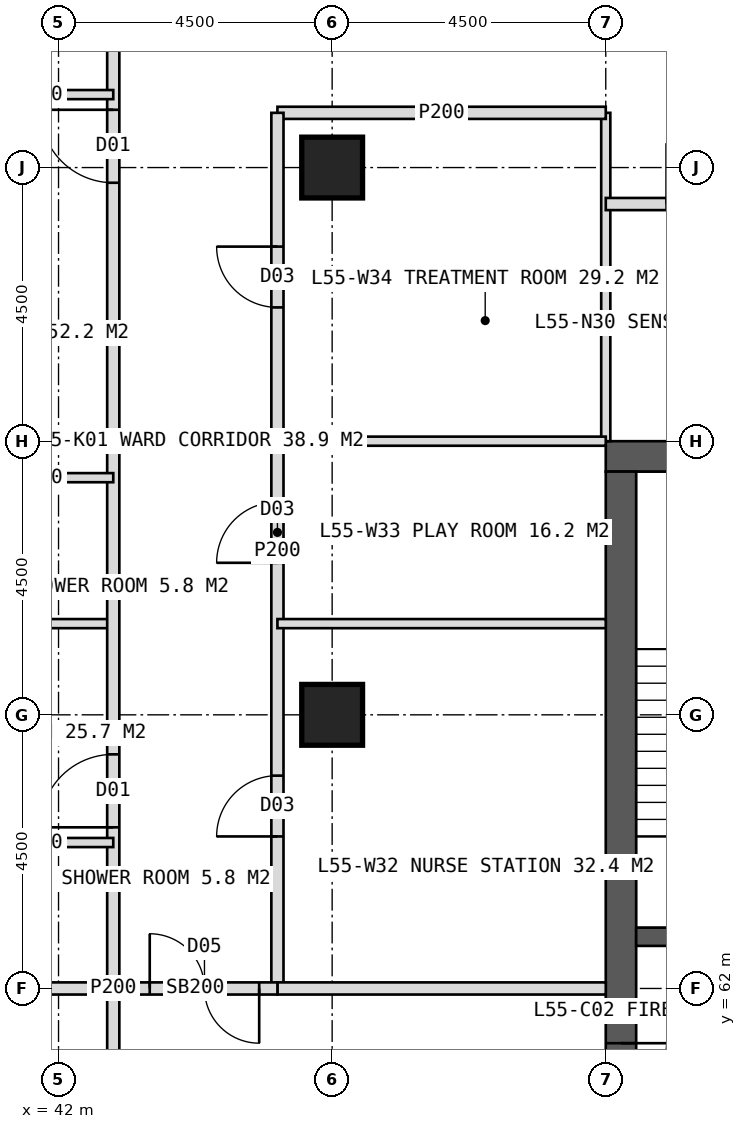
"""IFC4 building model, lengths in metres.
Left out: names, types, materials, properties, quantities, classifications, styles, units other than length and angle.
Written with IfcOpenShell. Run it as: python <this file> out.ifc"""

import sys

from ifc_helpers import new_model, si_unit, direction, frame, frame_2d, origin, origin_2d, place, context, subcontext, project, spatial, rectangle, hollow_rectangle, extrude, element, fill, save


model = new_model("IFC4")
c1 = context("Model", 3, precision=1e-05, world=origin(), true_north=direction((0.0, 1.0)))
c2 = subcontext(c1, "Body", "Model", "MODEL_VIEW")
j1 = project(units=[si_unit("LENGTHUNIT", "METRE"), si_unit("PLANEANGLEUNIT", "RADIAN")], contexts=[c1])
p1 = place(None, origin())
s1 = spatial("IfcSite", under=j1, at=p1, CompositionType="ELEMENT")
p2 = place(p1, origin())
s2 = spatial("IfcBuilding", under=s1, at=p2, CompositionType="ELEMENT")
p3 = place(p2, frame((0.0, 0.0, 229.0)))
s3 = spatial("IfcBuildingStorey", under=s2, at=p3, CompositionType="ELEMENT", Elevation=229.0)
p4 = place(p3, frame((51.0, 70.75, 0.0), z_axis=(0.0, 0.0, 1.0), x_axis=(1.0, 0.0, 0.0)))
e1 = element("IfcWall", 1, at=p4, inside=s3, PredefinedType="SHEAR", context=c2, shape_type="SweptSolid", body=[
    extrude(rectangle(XDim=18.0, YDim=0.5, at=frame_2d((9.0, 0.0))), origin(), (0.0, 0.0, 1.0), 4.0),
])
p5 = place(p4, frame((8.1, 0.0, 0.0)))
e2 = element("IfcOpeningElement", 2, at=p5, cuts=e1, PredefinedType="OPENING", context=c2, shape_type="SweptSolid", body=[
    extrude(rectangle(XDim=1.8, YDim=2.2, at=frame_2d((0.9, 1.1))), frame((0.0, 0.26, 0.0), z_axis=(0.0, -1.0, 0.0), x_axis=(1.0, 0.0, 0.0)), (0.0, 0.0, 1.0), 0.52),
])
p6 = place(p3, frame((51.25, 53.5, 0.0), z_axis=(0.0, 0.0, 1.0), x_axis=(0.0, 1.0, 0.0)))
e3 = element("IfcWall", 3, at=p6, inside=s3, PredefinedType="SHEAR", context=c2, shape_type="SweptSolid", body=[
    extrude(rectangle(XDim=17.0, YDim=0.5, at=frame_2d((8.5, 0.0))), origin(), (0.0, 0.0, 1.0), 4.0),
])
p7 = place(p6, frame((6.1, 0.0, 0.0)))
e4 = element("IfcOpeningElement", 4, at=p7, cuts=e3, PredefinedType="OPENING", context=c2, shape_type="SweptSolid", body=[
    extrude(rectangle(XDim=1.5, YDim=2.2, at=frame_2d((0.75, 1.1))), frame((0.0, 0.26, 0.0), z_axis=(0.0, -1.0, 0.0), x_axis=(1.0, 0.0, 0.0)), (0.0, 0.0, 1.0), 0.52),
])
p8 = place(p3, frame((51.5, 62.85, 0.0), z_axis=(0.0, 0.0, 1.0), x_axis=(1.0, 0.0, 0.0)))
e5 = element("IfcWall", 5, at=p8, inside=s3, PredefinedType="SHEAR", context=c2, shape_type="SweptSolid", body=[
    extrude(rectangle(XDim=3.3, YDim=0.3, at=frame_2d((1.65, 0.0))), origin(), (0.0, 0.0, 1.0), 4.0),
])
p9 = place(p8, frame((1.15, 0.0, 0.0)))
e6 = element("IfcOpeningElement", 6, at=p9, cuts=e5, PredefinedType="OPENING", context=c2, shape_type="SweptSolid", body=[
    extrude(rectangle(XDim=1.2, YDim=2.1, at=frame_2d((0.6, 1.05))), frame((0.0, 0.16, 0.0), z_axis=(0.0, -1.0, 0.0), x_axis=(1.0, 0.0, 0.0)), (0.0, 0.0, 1.0), 0.32),
])
for number, where, z_axis, x_axis in (
    (7, (46.5, 75.5, 0.0), (0.0, 0.0, 1.0), (1.0, 0.0, 0.0)),
    (8, (46.5, 66.5, 0.0), (0.0, 0.0, 1.0), (1.0, 0.0, 0.0)),
):
    element("IfcColumn", number, at=place(p3, frame(where, z_axis=z_axis, x_axis=x_axis)), inside=s3, PredefinedType="COLUMN", context=c2, shape_type="SweptSolid", body=[
        extrude(hollow_rectangle(XDim=1.0, YDim=1.0, WallThickness=0.1, at=origin_2d()), origin(), (0.0, 0.0, 1.0), 4.0),
    ])
p10 = place(p3, frame((51.0, 71.0, 0.0), z_axis=(0.0, 0.0, 1.0), x_axis=(0.0, 1.0, 0.0)))
e9 = element("IfcWall", 9, at=p10, inside=s3, PredefinedType="PARTITIONING", context=c2, shape_type="SweptSolid", body=[
    extrude(rectangle(XDim=5.4, YDim=0.15, at=frame_2d((2.7, 0.0))), origin(), (0.0, 0.0, 1.0), 3.75),
])
p11 = place(p3, frame((45.6, 76.4, 0.0), z_axis=(0.0, 0.0, 1.0), x_axis=(1.0, 0.0, 0.0)))
e10 = element("IfcWall", 10, at=p11, inside=s3, PredefinedType="PARTITIONING", context=c2, shape_type="SweptSolid", body=[
    extrude(rectangle(XDim=5.4, YDim=0.2, at=frame_2d((2.7, 0.0))), origin(), (0.0, 0.0, 1.0), 3.75),
])
p12 = place(p3, frame((51.0, 74.9, 0.0), z_axis=(0.0, 0.0, 1.0), x_axis=(1.0, 0.0, 0.0)))
e11 = element("IfcWall", 11, at=p12, inside=s3, PredefinedType="PARTITIONING", context=c2, shape_type="SweptSolid", body=[
    extrude(rectangle(XDim=6.75, YDim=0.2, at=frame_2d((3.375, 0.0))), origin(), (0.0, 0.0, 1.0), 3.75),
])
p13 = place(p12, frame((1.0, 0.0, 0.0)))
e12 = element("IfcOpeningElement", 12, at=p13, cuts=e11, PredefinedType="OPENING", context=c2, shape_type="SweptSolid", body=[
    extrude(rectangle(XDim=1.0, YDim=2.1, at=frame_2d((0.5, 1.05))), frame((0.0, 0.11, 0.0), z_axis=(0.0, -1.0, 0.0), x_axis=(1.0, 0.0, 0.0)), (0.0, 0.0, 1.0), 0.22),
])
p14 = place(p12, frame((5.425, 0.0, 0.0)))
e13 = element("IfcOpeningElement", 13, at=p14, cuts=e11, PredefinedType="OPENING", context=c2, shape_type="SweptSolid", body=[
    extrude(rectangle(XDim=1.0, YDim=2.1, at=frame_2d((0.5, 1.05))), frame((0.0, 0.11, 0.0), z_axis=(0.0, -1.0, 0.0), x_axis=(1.0, 0.0, 0.0)), (0.0, 0.0, 1.0), 0.22),
])
p15 = place(p3, frame((42.9, 62.0, 0.0), z_axis=(0.0, 0.0, 1.0), x_axis=(-1.0, 0.0, 0.0)))
e14 = element("IfcWall", 14, at=p15, inside=s3, PredefinedType="SOLIDWALL", context=c2, shape_type="SweptSolid", body=[
    extrude(rectangle(XDim=5.25, YDim=0.2, at=frame_2d((2.625, 0.0))), origin(), (0.0, 0.0, 1.0), 2.95),
])
p16 = place(p3, frame((42.9, 68.0, 0.0), z_axis=(0.0, 0.0, 1.0), x_axis=(-1.0, 0.0, 0.0)))
e15 = element("IfcWall", 15, at=p16, inside=s3, PredefinedType="PARTITIONING", context=c2, shape_type="SweptSolid", body=[
    extrude(rectangle(XDim=5.25, YDim=0.15, at=frame_2d((2.625, 0.0))), origin(), (0.0, 0.0, 1.0), 3.75),
])
p17 = place(p3, frame((42.9, 44.9, 0.0), z_axis=(0.0, 0.0, 1.0), x_axis=(0.0, 1.0, 0.0)))
e16 = element("IfcWall", 16, at=p17, inside=s3, PredefinedType="PARTITIONING", context=c2, shape_type="SweptSolid", body=[
    extrude(rectangle(XDim=34.2, YDim=0.2, at=frame_2d((17.1, 0.0))), origin(), (0.0, 0.0, 1.0), 3.75),
])
p18 = place(p17, frame((1.25, 0.0, 0.0)))
e17 = element("IfcOpeningElement", 17, at=p18, cuts=e16, PredefinedType="OPENING", context=c2, shape_type="SweptSolid", body=[
    extrude(rectangle(XDim=1.2, YDim=2.2, at=frame_2d((0.6, 1.1))), frame((0.0, 0.11, 0.0), z_axis=(0.0, -1.0, 0.0), x_axis=(1.0, 0.0, 0.0)), (0.0, 0.0, 1.0), 0.22),
])
p19 = place(p17, frame((7.75, 0.0, 0.0)))
e18 = element("IfcOpeningElement", 18, at=p19, cuts=e16, PredefinedType="OPENING", context=c2, shape_type="SweptSolid", body=[
    extrude(rectangle(XDim=1.2, YDim=2.2, at=frame_2d((0.6, 1.1))), frame((0.0, 0.11, 0.0), z_axis=(0.0, -1.0, 0.0), x_axis=(1.0, 0.0, 0.0)), (0.0, 0.0, 1.0), 0.22),
])
p20 = place(p17, frame((13.6, 0.0, 0.0)))
e19 = element("IfcOpeningElement", 19, at=p20, cuts=e16, PredefinedType="OPENING", context=c2, shape_type="SweptSolid", body=[
    extrude(rectangle(XDim=1.0, YDim=2.1, at=frame_2d((0.5, 1.05))), frame((0.0, 0.11, 0.0), z_axis=(0.0, -1.0, 0.0), x_axis=(1.0, 0.0, 0.0)), (0.0, 0.0, 1.0), 0.22),
])
p21 = place(p17, frame((19.75, 0.0, 0.0)))
e20 = element("IfcOpeningElement", 20, at=p21, cuts=e16, PredefinedType="OPENING", context=c2, shape_type="SweptSolid", body=[
    extrude(rectangle(XDim=1.2, YDim=2.2, at=frame_2d((0.6, 1.1))), frame((0.0, 0.11, 0.0), z_axis=(0.0, -1.0, 0.0), x_axis=(1.0, 0.0, 0.0)), (0.0, 0.0, 1.0), 0.22),
])
p22 = place(p17, frame((30.35, 0.0, 0.0)))
e21 = element("IfcOpeningElement", 21, at=p22, cuts=e16, PredefinedType="OPENING", context=c2, shape_type="SweptSolid", body=[
    extrude(rectangle(XDim=1.2, YDim=2.2, at=frame_2d((0.6, 1.1))), frame((0.0, 0.11, 0.0), z_axis=(0.0, -1.0, 0.0), x_axis=(1.0, 0.0, 0.0)), (0.0, 0.0, 1.0), 0.22),
])
for number, where, z_axis, x_axis in (
    (22, (42.9, 64.4, 0.0), (0.0, 0.0, 1.0), (-1.0, 0.0, 0.0)),
    (23, (42.9, 76.7, 0.0), (0.0, 0.0, 1.0), (-1.0, 0.0, 0.0)),
    (24, (42.9, 70.4, 0.0), (0.0, 0.0, 1.0), (-1.0, 0.0, 0.0)),
):
    element("IfcWall", number, at=place(p3, frame(where, z_axis=z_axis, x_axis=x_axis)), inside=s3, PredefinedType="PARTITIONING", context=c2, shape_type="SweptSolid", body=[
        extrude(rectangle(XDim=2.4, YDim=0.15, at=frame_2d((1.2, 0.0))), origin(), (0.0, 0.0, 1.0), 3.75),
    ])
p23 = place(p3, frame((45.6, 62.0, 0.0), z_axis=(0.0, 0.0, 1.0), x_axis=(0.0, 1.0, 0.0)))
e25 = element("IfcWall", 25, at=p23, inside=s3, PredefinedType="PARTITIONING", context=c2, shape_type="SweptSolid", body=[
    extrude(rectangle(XDim=14.4, YDim=0.2, at=frame_2d((7.2, 0.0))), origin(), (0.0, 0.0, 1.0), 3.75),
])
p24 = place(p23, frame((2.5, 0.0, 0.0)))
e26 = element("IfcOpeningElement", 26, at=p24, cuts=e25, PredefinedType="OPENING", context=c2, shape_type="SweptSolid", body=[
    extrude(rectangle(XDim=1.0, YDim=2.1, at=frame_2d((0.5, 1.05))), frame((0.0, 0.11, 0.0), z_axis=(0.0, -1.0, 0.0), x_axis=(1.0, 0.0, 0.0)), (0.0, 0.0, 1.0), 0.22),
])
p25 = place(p23, frame((7.0, 0.0, 0.0)))
e27 = element("IfcOpeningElement", 27, at=p25, cuts=e25, PredefinedType="OPENING", context=c2, shape_type="SweptSolid", body=[
    extrude(rectangle(XDim=1.0, YDim=2.1, at=frame_2d((0.5, 1.05))), frame((0.0, 0.11, 0.0), z_axis=(0.0, -1.0, 0.0), x_axis=(1.0, 0.0, 0.0)), (0.0, 0.0, 1.0), 0.22),
])
p26 = place(p23, frame((11.2, 0.0, 0.0)))
e28 = element("IfcOpeningElement", 28, at=p26, cuts=e25, PredefinedType="OPENING", context=c2, shape_type="SweptSolid", body=[
    extrude(rectangle(XDim=1.0, YDim=2.1, at=frame_2d((0.5, 1.05))), frame((0.0, 0.11, 0.0), z_axis=(0.0, -1.0, 0.0), x_axis=(1.0, 0.0, 0.0)), (0.0, 0.0, 1.0), 0.22),
])
p27 = place(p3, frame((51.0, 62.0, 0.0), z_axis=(0.0, 0.0, 1.0), x_axis=(-1.0, 0.0, 0.0)))
e29 = element("IfcWall", 29, at=p27, inside=s3, PredefinedType="SOLIDWALL", context=c2, shape_type="SweptSolid", body=[
    extrude(rectangle(XDim=5.4, YDim=0.2, at=frame_2d((2.7, 0.0))), origin(), (0.0, 0.0, 1.0), 2.95),
])
for number, where, z_axis, x_axis in (
    (30, (51.0, 68.0, 0.0), (0.0, 0.0, 1.0), (-1.0, 0.0, 0.0)),
    (31, (51.0, 71.0, 0.0), (0.0, 0.0, 1.0), (-1.0, 0.0, 0.0)),
):
    element("IfcWall", number, at=place(p3, frame(where, z_axis=z_axis, x_axis=x_axis)), inside=s3, PredefinedType="PARTITIONING", context=c2, shape_type="SweptSolid", body=[
        extrude(rectangle(XDim=5.4, YDim=0.15, at=frame_2d((2.7, 0.0))), origin(), (0.0, 0.0, 1.0), 3.75),
    ])
p28 = place(p3, frame((45.6, 62.0, 0.0), z_axis=(0.0, 0.0, 1.0), x_axis=(-1.0, 0.0, 0.0)))
e32 = element("IfcWall", 32, at=p28, inside=s3, PredefinedType="SOLIDWALL", context=c2, shape_type="SweptSolid", body=[
    extrude(rectangle(XDim=2.7, YDim=0.2, at=frame_2d((1.35, 0.0))), origin(), (0.0, 0.0, 1.0), 2.95),
])
p29 = place(p28, frame((0.3, 0.0, 0.0)))
e33 = element("IfcOpeningElement", 33, at=p29, cuts=e32, PredefinedType="OPENING", context=c2, shape_type="SweptSolid", body=[
    extrude(rectangle(XDim=1.8, YDim=2.2, at=frame_2d((0.9, 1.1))), frame((0.0, 0.11, 0.0), z_axis=(0.0, -1.0, 0.0), x_axis=(1.0, 0.0, 0.0)), (0.0, 0.0, 1.0), 0.22),
])
p30 = place(p21, origin())
e34 = element("IfcDoor", 34, at=p30, inside=s3, OperationType="SINGLE_SWING_LEFT", PredefinedType="DOOR", context=c2, shape_type="SweptSolid", body=[
    extrude(rectangle(XDim=1.2, YDim=2.2, at=frame_2d((0.6, 1.1))), frame((0.0, 0.025, 0.0), z_axis=(0.0, -1.0, 0.0), x_axis=(1.0, 0.0, 0.0)), (0.0, 0.0, 1.0), 0.05),
])
fill(e20, e34)
p31 = place(p22, origin())
e35 = element("IfcDoor", 35, at=p31, inside=s3, OperationType="SINGLE_SWING_RIGHT", PredefinedType="DOOR", context=c2, shape_type="SweptSolid", body=[
    extrude(rectangle(XDim=1.2, YDim=2.2, at=frame_2d((0.6, 1.1))), frame((0.0, 0.025, 0.0), z_axis=(0.0, -1.0, 0.0), x_axis=(1.0, 0.0, 0.0)), (0.0, 0.0, 1.0), 0.05),
])
fill(e21, e35)
p32 = place(p24, origin())
e36 = element("IfcDoor", 36, at=p32, inside=s3, OperationType="SINGLE_SWING_LEFT", PredefinedType="DOOR", context=c2, shape_type="SweptSolid", body=[
    extrude(rectangle(XDim=1.0, YDim=2.1, at=frame_2d((0.5, 1.05))), frame((0.0, 0.025, 0.0), z_axis=(0.0, -1.0, 0.0), x_axis=(1.0, 0.0, 0.0)), (0.0, 0.0, 1.0), 0.05),
])
fill(e26, e36)
p33 = place(p25, origin())
e37 = element("IfcDoor", 37, at=p33, inside=s3, OperationType="SINGLE_SWING_LEFT", PredefinedType="DOOR", context=c2, shape_type="SweptSolid", body=[
    extrude(rectangle(XDim=1.0, YDim=2.1, at=frame_2d((0.5, 1.05))), frame((0.0, 0.025, 0.0), z_axis=(0.0, -1.0, 0.0), x_axis=(1.0, 0.0, 0.0)), (0.0, 0.0, 1.0), 0.05),
])
fill(e27, e37)
p34 = place(p26, origin())
e38 = element("IfcDoor", 38, at=p34, inside=s3, OperationType="SINGLE_SWING_RIGHT", PredefinedType="DOOR", context=c2, shape_type="SweptSolid", body=[
    extrude(rectangle(XDim=1.0, YDim=2.1, at=frame_2d((0.5, 1.05))), frame((0.0, 0.025, 0.0), z_axis=(0.0, -1.0, 0.0), x_axis=(1.0, 0.0, 0.0)), (0.0, 0.0, 1.0), 0.05),
])
fill(e28, e38)
p35 = place(p29, origin())
e39 = element("IfcDoor", 39, at=p35, inside=s3, OperationType="DOUBLE_DOOR_DOUBLE_SWING", PredefinedType="DOOR", context=c2, shape_type="SweptSolid", body=[
    extrude(rectangle(XDim=1.8, YDim=2.2, at=frame_2d((0.9, 1.1))), frame((0.0, 0.025, 0.0), z_axis=(0.0, -1.0, 0.0), x_axis=(1.0, 0.0, 0.0)), (0.0, 0.0, 1.0), 0.05),
])
fill(e33, e39)
p36 = place(p7, origin())
e40 = element("IfcDoor", 40, at=p36, inside=s3, OperationType="DOUBLE_DOOR_SINGLE_SWING", PredefinedType="DOOR", context=c2, shape_type="SweptSolid", body=[
    extrude(rectangle(XDim=1.5, YDim=2.2, at=frame_2d((0.75, 1.1))), frame((0.0, 0.025, 0.0), z_axis=(0.0, -1.0, 0.0), x_axis=(1.0, 0.0, 0.0)), (0.0, 0.0, 1.0), 0.05),
])
fill(e4, e40)
save(model, sys.argv[1])
